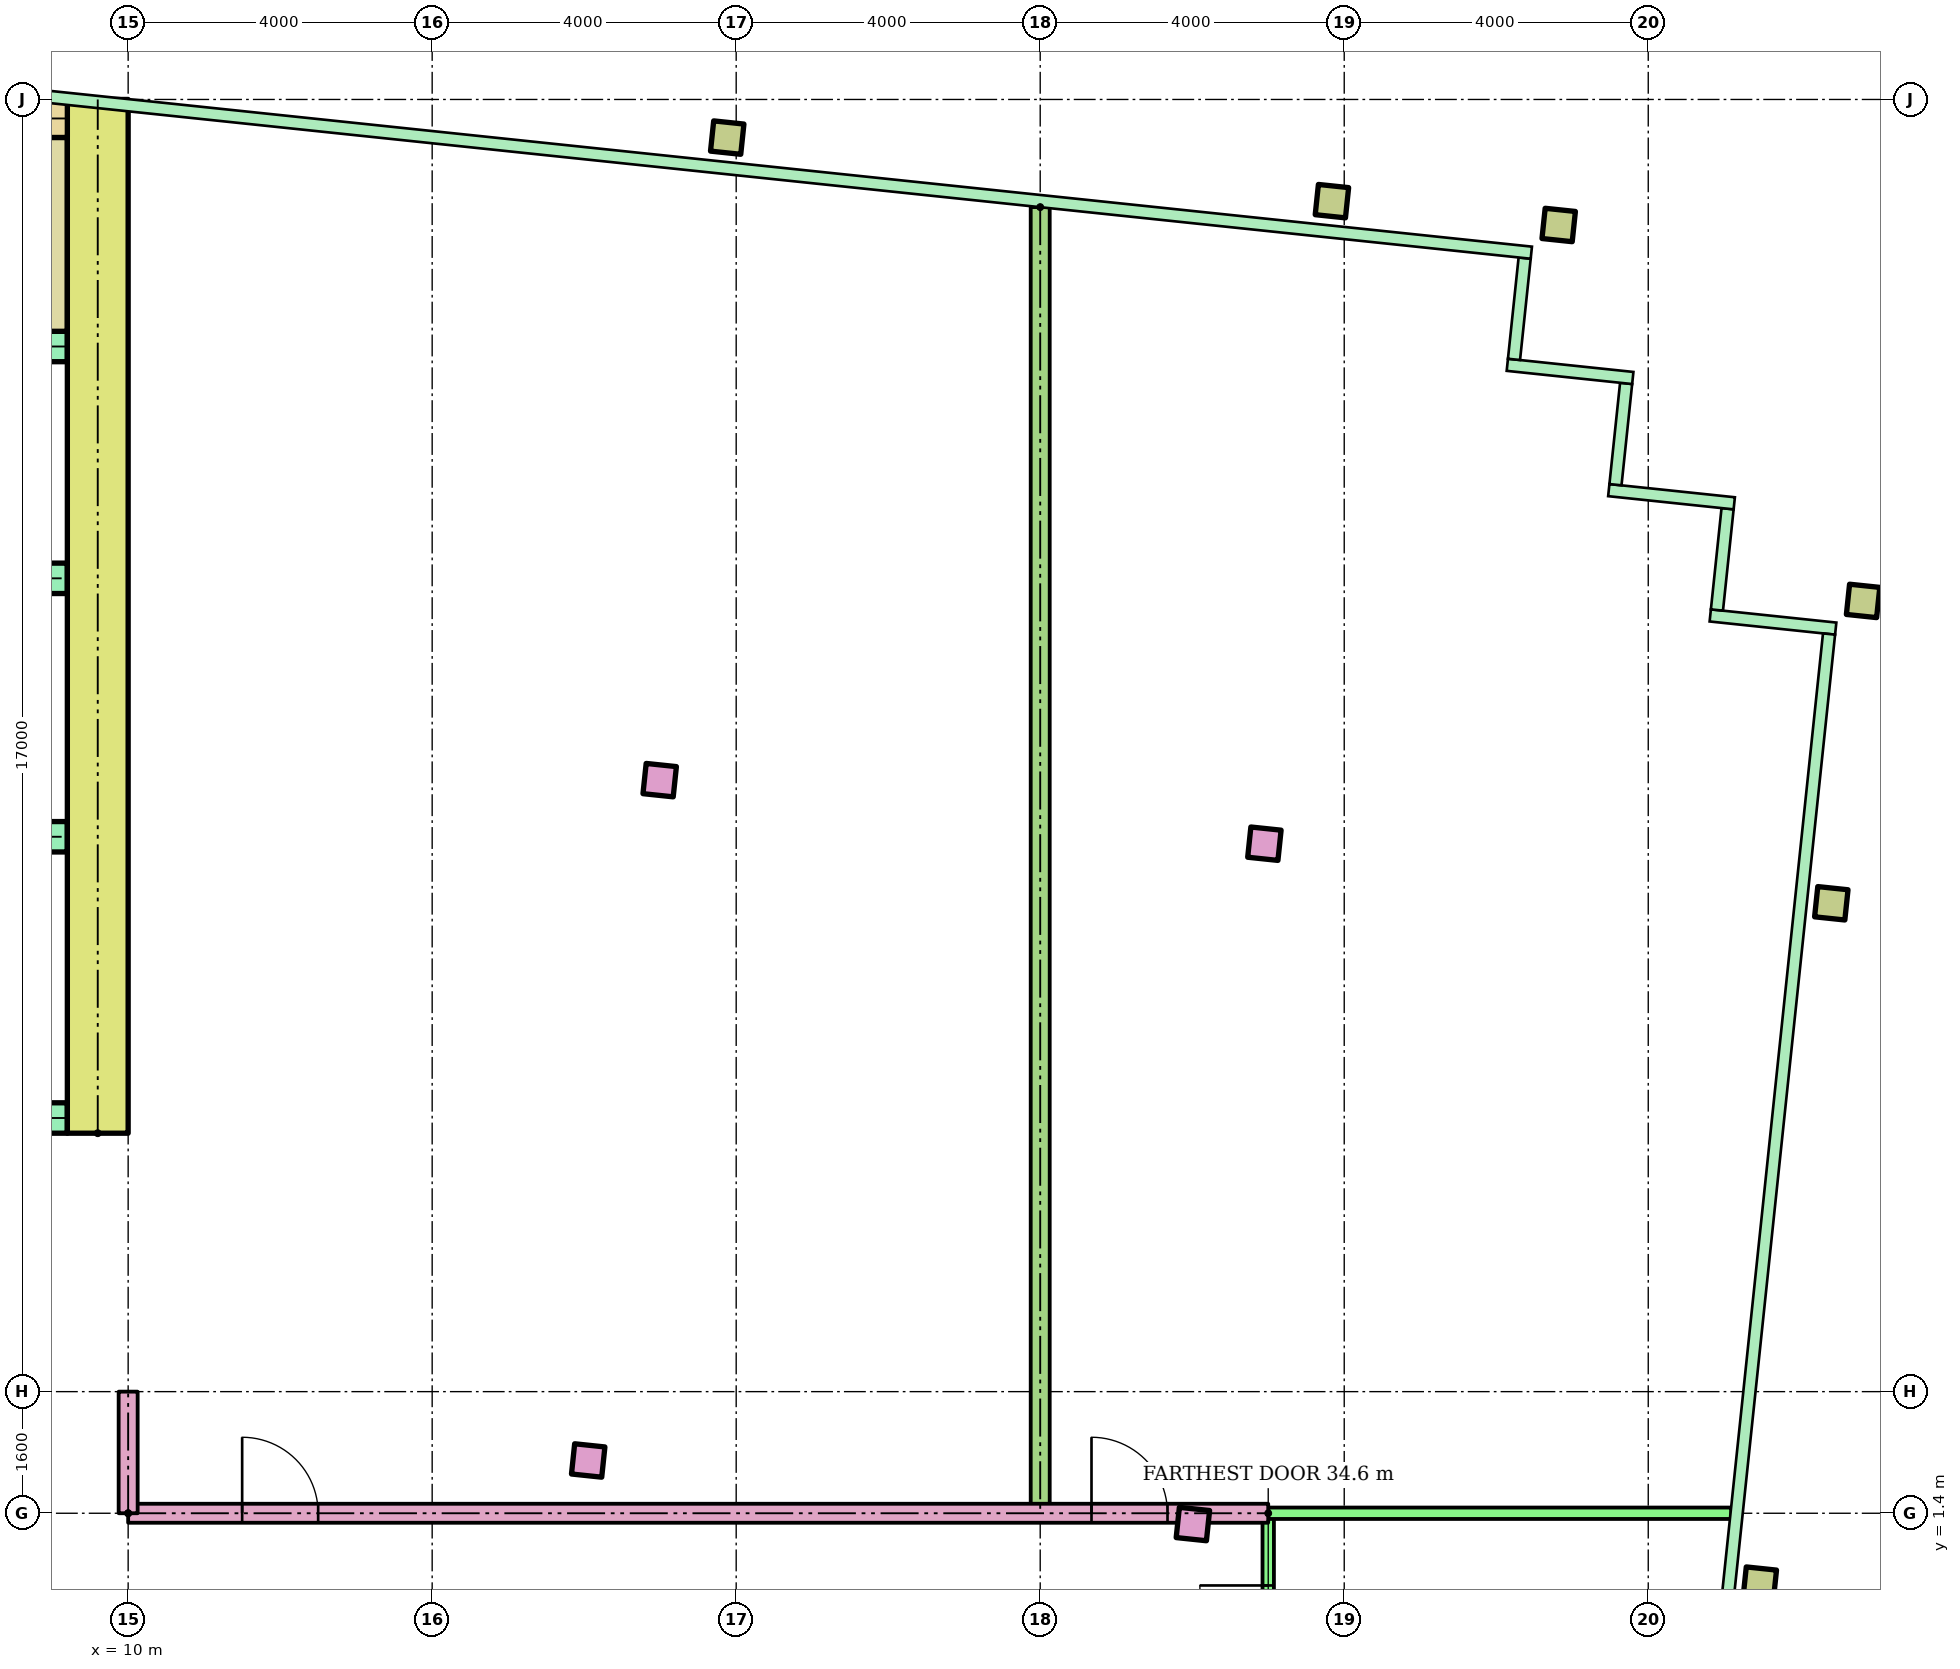
"""IFC4 building model, lengths in metres.
Left out: names, types, materials, properties, quantities, classifications, styles, units other than length and angle.
Written with IfcOpenShell. Run it as: python <this file> out.ifc"""

import sys

from ifc_helpers import new_model, si_unit, direction, frame, frame_2d, origin, origin_2d, place, context, subcontext, project, spatial, rectangle, hollow_rectangle, extrude, element, fill, save


model = new_model("IFC4")
c1 = context("Model", 3, precision=1e-05, world=origin(), true_north=direction((0.0, 1.0)))
c2 = subcontext(c1, "Body", "Model", "MODEL_VIEW")
j1 = project(units=[si_unit("LENGTHUNIT", "METRE"), si_unit("PLANEANGLEUNIT", "RADIAN")], contexts=[c1])
p1 = place(None, origin())
s1 = spatial("IfcSite", under=j1, at=p1, CompositionType="ELEMENT")
p2 = place(p1, origin())
s2 = spatial("IfcBuilding", under=s1, at=p2, CompositionType="ELEMENT")
p3 = place(p2, frame((0.0, 0.0, 298.3)))
s3 = spatial("IfcBuildingStorey", under=s2, at=p3, CompositionType="ELEMENT", Elevation=298.3)
for number, where, z_axis, x_axis in (
    (1, (16.053, 2.094, 0.0), (0.0, 0.0, 1.0), (0.995, -0.105, 0.0)),
    (2, (24.009, 1.258, 0.0), (0.0, 0.0, 1.0), (0.995, -0.105, 0.0)),
):
    element("IfcColumn", number, at=place(p3, frame(where, z_axis=z_axis, x_axis=x_axis)), inside=s3, PredefinedType="COLUMN", context=c2, shape_type="SweptSolid", body=[
        extrude(rectangle(XDim=0.4, YDim=0.4, at=origin_2d()), origin(), (0.0, 0.0, 1.0), 3.4),
    ])
p4 = place(p3, frame((31.468, 0.474, 0.0), z_axis=(0.0, 0.0, 1.0), x_axis=(0.994521895368, -0.104528463268, 0.0)))
e3 = element("IfcColumn", 3, at=p4, inside=s3, PredefinedType="COLUMN", context=c2, shape_type="SweptSolid", body=[
    extrude(hollow_rectangle(XDim=0.4, YDim=0.4, WallThickness=0.02, at=origin_2d()), origin(), (0.0, 0.0, 1.0), 3.4),
])
for number, where, z_axis, x_axis in (
    (4, (16.993, 11.045, 0.0), (0.0, 0.0, 1.0), (0.995, -0.105, 0.0)),
    (5, (24.95, 10.209, 0.0), (0.0, 0.0, 1.0), (0.995, -0.105, 0.0)),
):
    element("IfcColumn", number, at=place(p3, frame(where, z_axis=z_axis, x_axis=x_axis)), inside=s3, PredefinedType="COLUMN", context=c2, shape_type="SweptSolid", body=[
        extrude(rectangle(XDim=0.4, YDim=0.4, at=origin_2d()), origin(), (0.0, 0.0, 1.0), 3.4),
    ])
for number, where, z_axis, x_axis in (
    (6, (32.409, 9.425, 0.0), (0.0, 0.0, 1.0), (0.995, -0.105, 0.0)),
    (7, (32.827, 13.403, 0.0), (0.0, 0.0, 1.0), (0.995, -0.105, 0.0)),
    (8, (17.882, 19.498, 0.0), (0.0, 0.0, 1.0), (0.995, -0.105, 0.0)),
    (9, (25.838, 18.662, 0.0), (0.0, 0.0, 1.0), (0.995, -0.105, 0.0)),
    (10, (28.822, 18.349, 0.0), (0.0, 0.0, 1.0), (0.995, -0.105, 0.0)),
):
    element("IfcColumn", number, at=place(p3, frame(where, z_axis=z_axis, x_axis=x_axis)), inside=s3, PredefinedType="COLUMN", context=c2, shape_type="SweptSolid", body=[
        extrude(hollow_rectangle(XDim=0.4, YDim=0.4, WallThickness=0.02, at=origin_2d()), origin(), (0.0, 0.0, 1.0), 3.4),
    ])
p5 = place(p3, frame((9.6, 6.4, 0.0), z_axis=(0.0, 0.0, 1.0), x_axis=(0.0, 1.0, 0.0)))
e11 = element("IfcWall", 11, at=p5, inside=s3, PredefinedType="SHEAR", context=c2, shape_type="SweptSolid", body=[
    extrude(rectangle(XDim=13.6, YDim=0.8, at=frame_2d((6.8, 0.0))), origin(), (0.0, 0.0, 1.0), 2.9),
])
p6 = place(p3, frame((-9.2, 19.75, 0.0)))
e12 = element("IfcWall", 12, at=p6, inside=s3, PredefinedType="SHEAR", context=c2, shape_type="SweptSolid", body=[
    extrude(rectangle(XDim=18.4, YDim=0.5, at=frame_2d((9.2, 0.0))), origin(), (0.0, 0.0, 1.0), 2.9),
])
p7 = place(p3, frame((-9.2, 6.6, 0.0)))
e13 = element("IfcWall", 13, at=p7, inside=s3, PredefinedType="SHEAR", context=c2, shape_type="SweptSolid", body=[
    extrude(rectangle(XDim=18.4, YDim=0.4, at=frame_2d((9.2, 0.0))), origin(), (0.0, 0.0, 1.0), 2.9),
])
p8 = place(p7, frame((8.3, 0.0, 0.0)))
e14 = element("IfcOpeningElement", 14, at=p8, cuts=e13, PredefinedType="OPENING", context=c2, shape_type="SweptSolid", body=[
    extrude(rectangle(XDim=1.8, YDim=2.1, at=frame_2d((0.9, 1.05))), frame((0.0, 0.21, 0.0), z_axis=(0.0, -1.0, 0.0), x_axis=(1.0, 0.0, 0.0)), (0.0, 0.0, 1.0), 0.42),
])
p9 = place(p7, frame((3.8, 0.0, 0.0)))
e15 = element("IfcOpeningElement", 15, at=p9, cuts=e13, PredefinedType="OPENING", context=c2, shape_type="SweptSolid", body=[
    extrude(rectangle(XDim=1.8, YDim=2.1, at=frame_2d((0.9, 1.05))), frame((0.0, 0.21, 0.0), z_axis=(0.0, -1.0, 0.0), x_axis=(1.0, 0.0, 0.0)), (0.0, 0.0, 1.0), 0.42),
])
p10 = place(p7, frame((12.8, 0.0, 0.0)))
e16 = element("IfcOpeningElement", 16, at=p10, cuts=e13, PredefinedType="OPENING", context=c2, shape_type="SweptSolid", body=[
    extrude(rectangle(XDim=1.8, YDim=2.1, at=frame_2d((0.9, 1.05))), frame((0.0, 0.21, 0.0), z_axis=(0.0, -1.0, 0.0), x_axis=(1.0, 0.0, 0.0)), (0.0, 0.0, 1.0), 0.42),
])
p11 = place(p3, frame((1.2, 10.3, 0.0)))
e17 = element("IfcWall", 17, at=p11, inside=s3, PredefinedType="SHEAR", context=c2, shape_type="SweptSolid", body=[
    extrude(rectangle(XDim=8.0, YDim=0.4, at=frame_2d((4.0, 0.0))), origin(), (0.0, 0.0, 1.0), 2.9),
])
p12 = place(p11, frame((0.817, 0.0, 0.0)))
e18 = element("IfcOpeningElement", 18, at=p12, cuts=e17, PredefinedType="OPENING", context=c2, shape_type="SweptSolid", body=[
    extrude(rectangle(XDim=1.1, YDim=2.1, at=frame_2d((0.55, 1.05))), frame((0.0, 0.21, 0.0), z_axis=(0.0, -1.0, 0.0), x_axis=(1.0, 0.0, 0.0)), (0.0, 0.0, 1.0), 0.42),
])
p13 = place(p11, frame((3.55, 0.0, 0.0)))
e19 = element("IfcOpeningElement", 19, at=p13, cuts=e17, PredefinedType="OPENING", context=c2, shape_type="SweptSolid", body=[
    extrude(rectangle(XDim=1.1, YDim=2.1, at=frame_2d((0.55, 1.05))), frame((0.0, 0.21, 0.0), z_axis=(0.0, -1.0, 0.0), x_axis=(1.0, 0.0, 0.0)), (0.0, 0.0, 1.0), 0.42),
])
p14 = place(p11, frame((6.283, 0.0, 0.0)))
e20 = element("IfcOpeningElement", 20, at=p14, cuts=e17, PredefinedType="OPENING", context=c2, shape_type="SweptSolid", body=[
    extrude(rectangle(XDim=1.1, YDim=2.1, at=frame_2d((0.55, 1.05))), frame((0.0, 0.21, 0.0), z_axis=(0.0, -1.0, 0.0), x_axis=(1.0, 0.0, 0.0)), (0.0, 0.0, 1.0), 0.42),
])
p15 = place(p3, frame((1.2, 13.7, 0.0)))
e21 = element("IfcWall", 21, at=p15, inside=s3, PredefinedType="SHEAR", context=c2, shape_type="SweptSolid", body=[
    extrude(rectangle(XDim=8.0, YDim=0.4, at=frame_2d((4.0, 0.0))), origin(), (0.0, 0.0, 1.0), 2.9),
])
p16 = place(p3, frame((-9.2, 16.75, 0.0)))
e22 = element("IfcWall", 22, at=p16, inside=s3, PredefinedType="SHEAR", context=c2, shape_type="SweptSolid", body=[
    extrude(rectangle(XDim=18.4, YDim=0.4, at=frame_2d((9.2, 0.0))), origin(), (0.0, 0.0, 1.0), 2.9),
])
p17 = place(p16, frame((0.1, 0.0, 0.0)))
e23 = element("IfcOpeningElement", 23, at=p17, cuts=e22, PredefinedType="OPENING", context=c2, shape_type="SweptSolid", body=[
    extrude(rectangle(XDim=0.95, YDim=2.1, at=frame_2d((0.475, 1.05))), frame((0.0, 0.21, 0.0), z_axis=(0.0, -1.0, 0.0), x_axis=(1.0, 0.0, 0.0)), (0.0, 0.0, 1.0), 0.42),
])
p18 = place(p16, frame((6.1, 0.0, 0.0)))
e24 = element("IfcOpeningElement", 24, at=p18, cuts=e22, PredefinedType="OPENING", context=c2, shape_type="SweptSolid", body=[
    extrude(rectangle(XDim=0.95, YDim=2.1, at=frame_2d((0.475, 1.05))), frame((0.0, 0.21, 0.0), z_axis=(0.0, -1.0, 0.0), x_axis=(1.0, 0.0, 0.0)), (0.0, 0.0, 1.0), 0.42),
])
p19 = place(p16, frame((12.1, 0.0, 0.0)))
e25 = element("IfcOpeningElement", 25, at=p19, cuts=e22, PredefinedType="OPENING", context=c2, shape_type="SweptSolid", body=[
    extrude(rectangle(XDim=0.95, YDim=2.1, at=frame_2d((0.475, 1.05))), frame((0.0, 0.21, 0.0), z_axis=(0.0, -1.0, 0.0), x_axis=(1.0, 0.0, 0.0)), (0.0, 0.0, 1.0), 0.42),
])
p20 = place(p3, frame((8.75, 16.95, 0.0), z_axis=(0.0, 0.0, 1.0), x_axis=(0.0, 1.0, 0.0)))
e26 = element("IfcWall", 26, at=p20, inside=s3, PredefinedType="SHEAR", context=c2, shape_type="SweptSolid", body=[
    extrude(rectangle(XDim=2.55, YDim=0.9, at=frame_2d((1.275, 0.0))), origin(), (0.0, 0.0, 1.0), 2.9),
])
p21 = place(p3, frame((25.0, -1.4, 0.0), z_axis=(0.0, 0.0, 1.0), x_axis=(0.0, 1.0, 0.0)))
e27 = element("IfcWall", 27, at=p21, inside=s3, PredefinedType="PARTITIONING", context=c2, shape_type="SweptSolid", body=[
    extrude(rectangle(XDim=2.8, YDim=0.15, at=frame_2d((1.4, 0.0))), origin(), (0.0, 0.0, 1.0), 2.6),
])
p22 = place(p21, frame((0.95, 0.0, 0.0)))
e28 = element("IfcOpeningElement", 28, at=p22, cuts=e27, PredefinedType="OPENING", context=c2, shape_type="SweptSolid", body=[
    extrude(rectangle(XDim=0.9, YDim=2.1, at=frame_2d((0.45, 1.05))), frame((0.0, 0.085, 0.0), z_axis=(0.0, -1.0, 0.0), x_axis=(1.0, 0.0, 0.0)), (0.0, 0.0, 1.0), 0.17),
])
p23 = place(p3, frame((10.0, 1.4, 0.0)))
e29 = element("IfcWall", 29, at=p23, inside=s3, PredefinedType="PARTITIONING", context=c2, shape_type="SweptSolid", body=[
    extrude(rectangle(XDim=15.0, YDim=0.25, at=frame_2d((7.5, 0.0))), origin(), (0.0, 0.0, 1.0), 2.6),
])
p24 = place(p23, frame((1.5, 0.0, 0.0)))
e30 = element("IfcOpeningElement", 30, at=p24, cuts=e29, PredefinedType="OPENING", context=c2, shape_type="SweptSolid", body=[
    extrude(rectangle(XDim=1.0, YDim=2.1, at=frame_2d((0.5, 1.05))), frame((0.0, 0.135, 0.0), z_axis=(0.0, -1.0, 0.0), x_axis=(1.0, 0.0, 0.0)), (0.0, 0.0, 1.0), 0.27),
])
p25 = place(p23, frame((12.675, 0.0, 0.0)))
e31 = element("IfcOpeningElement", 31, at=p25, cuts=e29, PredefinedType="OPENING", context=c2, shape_type="SweptSolid", body=[
    extrude(rectangle(XDim=1.0, YDim=2.1, at=frame_2d((0.5, 1.05))), frame((0.0, 0.135, 0.0), z_axis=(0.0, -1.0, 0.0), x_axis=(1.0, 0.0, 0.0)), (0.0, 0.0, 1.0), 0.27),
])
p26 = place(p3, frame((25.0, 1.4, 0.0)))
e32 = element("IfcWall", 32, at=p26, inside=s3, PredefinedType="PARTITIONING", context=c2, shape_type="SweptSolid", body=[
    extrude(rectangle(XDim=6.093, YDim=0.15, at=frame_2d((3.046, 0.0))), origin(), (0.0, 0.0, 1.0), 2.6),
])
p27 = place(p3, frame((22.0, 18.584, 0.0), z_axis=(0.0, 0.0, 1.0), x_axis=(0.0, -1.0, 0.0)))
e33 = element("IfcWall", 33, at=p27, inside=s3, PredefinedType="PARTITIONING", context=c2, shape_type="SweptSolid", body=[
    extrude(rectangle(XDim=17.184, YDim=0.25, at=frame_2d((8.592, 0.0))), origin(), (0.0, 0.0, 1.0), 2.6),
])
p28 = place(p3, frame((10.0, 1.4, 0.0), z_axis=(0.0, 0.0, 1.0), x_axis=(0.0, 1.0, 0.0)))
e34 = element("IfcWall", 34, at=p28, inside=s3, PredefinedType="PARTITIONING", context=c2, shape_type="SweptSolid", body=[
    extrude(rectangle(XDim=1.6, YDim=0.25, at=frame_2d((0.8, 0.0))), origin(), (0.0, 0.0, 1.0), 2.6),
])
p29 = place(p22, origin())
e35 = element("IfcDoor", 35, at=p29, inside=s3, OperationType="SINGLE_SWING_RIGHT", PredefinedType="DOOR", context=c2, shape_type="SweptSolid", body=[
    extrude(rectangle(XDim=0.9, YDim=2.1, at=frame_2d((0.45, 1.05))), frame((0.0, 0.025, 0.0), z_axis=(0.0, -1.0, 0.0), x_axis=(1.0, 0.0, 0.0)), (0.0, 0.0, 1.0), 0.05),
])
fill(e28, e35)
p30 = place(p24, origin())
e36 = element("IfcDoor", 36, at=p30, inside=s3, OperationType="SINGLE_SWING_LEFT", PredefinedType="DOOR", context=c2, shape_type="SweptSolid", body=[
    extrude(rectangle(XDim=1.0, YDim=2.1, at=frame_2d((0.5, 1.05))), frame((0.0, 0.025, 0.0), z_axis=(0.0, -1.0, 0.0), x_axis=(1.0, 0.0, 0.0)), (0.0, 0.0, 1.0), 0.05),
])
fill(e30, e36)
p31 = place(p25, origin())
e37 = element("IfcDoor", 37, at=p31, inside=s3, OperationType="SINGLE_SWING_LEFT", PredefinedType="DOOR", context=c2, shape_type="SweptSolid", body=[
    extrude(rectangle(XDim=1.0, YDim=2.1, at=frame_2d((0.5, 1.05))), frame((0.0, 0.025, 0.0), z_axis=(0.0, -1.0, 0.0), x_axis=(1.0, 0.0, 0.0)), (0.0, 0.0, 1.0), 0.05),
])
fill(e31, e37)
save(model, sys.argv[1])
